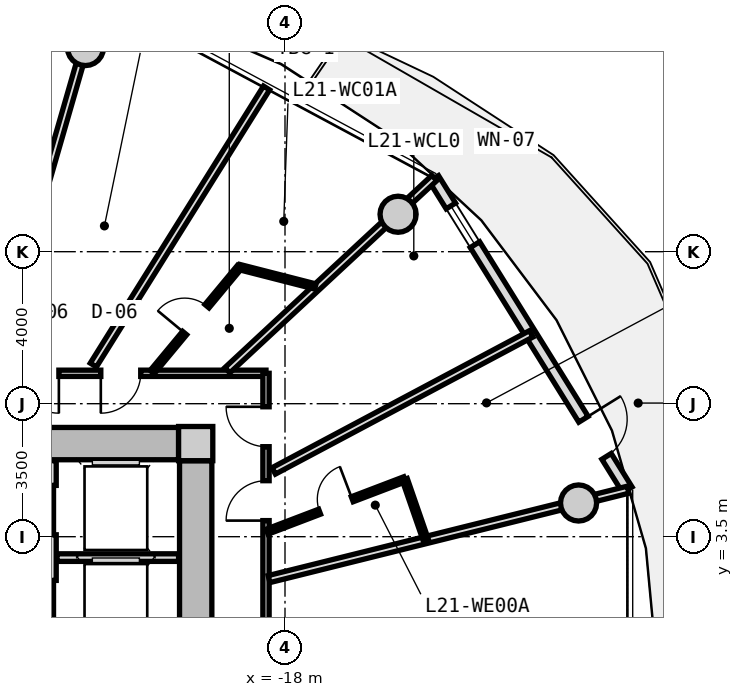
"""IFC4 building model, lengths in metres.
Left out: names, types, materials, properties, quantities, classifications, styles, units other than length and angle.
Written with IfcOpenShell. Run it as: python <this file> out.ifc"""

import sys

from ifc_helpers import new_model, si_unit, direction, frame, frame_2d, origin, origin_2d, place, context, subcontext, project, spatial, rectangle, circle, extrude, source, transform, mapped, element, fill, save


model = new_model("IFC4")
c1 = context("Model", 3, precision=1e-05, world=origin(), true_north=direction((0.0, 1.0)))
c2 = subcontext(c1, "Body", "Model", "MODEL_VIEW")
j1 = project(units=[si_unit("LENGTHUNIT", "METRE"), si_unit("PLANEANGLEUNIT", "RADIAN")], contexts=[c1])
p1 = place(None, origin())
s1 = spatial("IfcSite", under=j1, at=p1, CompositionType="ELEMENT")
p2 = place(p1, origin())
s2 = spatial("IfcBuilding", under=s1, at=p2, CompositionType="ELEMENT")
p3 = place(p2, frame((0.0, 0.0, 70.4)))
s3 = spatial("IfcBuildingStorey", under=s2, at=p3, CompositionType="ELEMENT", Elevation=70.4)
m1 = source(origin(), c2, "Body", "SweptSolid", [
    extrude(rectangle(XDim=0.9, YDim=0.9, at=origin_2d()), origin(), (0.0, 0.0, 1.0), 3.05),
])
p4 = place(p3, frame((-20.35, 5.95, 0.0), z_axis=(0.0, 0.0, 1.0), x_axis=(1.0, 0.0, 0.0)))
e1 = element("IfcColumn", 1, at=p4, inside=s3, PredefinedType="COLUMN", context=c2, shape_type="MappedRepresentation", body=[
    mapped(m1, transform((0.0, 0.0, 0.0), x_axis=(1.0, 0.0, 0.0), y_axis=(0.0, 1.0, 0.0), z_axis=(0.0, 0.0, 1.0), scale=1.0)),
])
m2 = source(origin(), c2, "Body", "SweptSolid", [
    extrude(rectangle(XDim=14.4, YDim=0.85, at=frame_2d((7.2, 0.0))), origin(), (0.0, 0.0, 1.0), 2.73),
])
p5 = place(p3, frame((-35.2, 5.95, 0.0), z_axis=(0.0, 0.0, 1.0), x_axis=(1.0, 0.0, 0.0)))
e2 = element("IfcWall", 2, at=p5, inside=s3, PredefinedType="SHEAR", context=c2, shape_type="MappedRepresentation", body=[
    mapped(m2, transform((0.0, 0.0, 0.0), x_axis=(1.0, 0.0, 0.0), y_axis=(0.0, 1.0, 0.0), z_axis=(0.0, 0.0, 1.0), scale=1.0)),
])
m3 = source(origin(), c2, "Body", "SweptSolid", [
    extrude(rectangle(XDim=11.0, YDim=0.85, at=frame_2d((5.5, 0.0))), origin(), (0.0, 0.0, 1.0), 2.73),
])
p6 = place(p3, frame((-20.35, 5.5, 0.0), z_axis=(0.0, 0.0, 1.0), x_axis=(0.0, -1.0, 0.0)))
e3 = element("IfcWall", 3, at=p6, inside=s3, PredefinedType="SHEAR", context=c2, shape_type="MappedRepresentation", body=[
    mapped(m3, transform((0.0, 0.0, 0.0), x_axis=(1.0, 0.0, 0.0), y_axis=(0.0, 1.0, 0.0), z_axis=(0.0, 0.0, 1.0), scale=1.0)),
])
p7 = place(p6, frame((5.65, 0.0, 0.0)))
e4 = element("IfcOpeningElement", 4, at=p7, cuts=e3, PredefinedType="OPENING", context=c2, shape_type="SweptSolid", body=[
    extrude(rectangle(XDim=1.2, YDim=2.15, at=frame_2d((0.6, 1.075))), frame((0.0, 0.435, 0.0), z_axis=(0.0, -1.0, 0.0), x_axis=(1.0, 0.0, 0.0)), (0.0, 0.0, 1.0), 0.87),
])
m4 = source(origin(), c2, "Body", "SweptSolid", [
    extrude(circle(Radius=0.475, at=origin_2d()), origin(), (0.0, 0.0, 1.0), 3.05),
])
for number, where, z_axis, x_axis in (
    (5, (-10.275, 4.387, 0.0), (0.0, 0.0, 1.0), (1.0, 0.0, 0.0)),
    (6, (-15.025, 11.985, 0.0), (0.0, 0.0, 1.0), (1.0, 0.0, 0.0)),
    (7, (-23.251, 16.373, 0.0), (0.0, 0.0, 1.0), (1.0, 0.0, 0.0)),
):
    element("IfcColumn", number, at=place(p3, frame(where, z_axis=z_axis, x_axis=x_axis)), inside=s3, PredefinedType="COLUMN", context=c2, shape_type="MappedRepresentation", body=[
        mapped(m4, transform((0.0, 0.0, 0.0), x_axis=(1.0, 0.0, 0.0), y_axis=(0.0, 1.0, 0.0), z_axis=(0.0, 0.0, 1.0), scale=1.0)),
    ])
m5 = source(origin(), c2, "Body", "SweptSolid", [
    extrude(rectangle(XDim=9.649, YDim=0.29, at=frame_2d((4.824, 0.0))), origin(), (0.0, 0.0, 1.0), 2.73),
])
p8 = place(p3, frame((-14.084, 12.926, 0.0), z_axis=(0.0, 0.0, 1.0), x_axis=(0.527909458386, -0.849300655684, 0.0)))
e8 = element("IfcWall", 8, at=p8, inside=s3, PredefinedType="SOLIDWALL", context=c2, shape_type="MappedRepresentation", body=[
    mapped(m5, transform((0.0, 0.0, 0.0), x_axis=(1.0, 0.0, 0.0), y_axis=(0.0, 1.0, 0.0), z_axis=(0.0, 0.0, 1.0), scale=1.0)),
])
p9 = place(p8, frame((7.46, 0.0, 0.0)))
e9 = element("IfcOpeningElement", 9, at=p9, cuts=e8, PredefinedType="OPENING", context=c2, shape_type="SweptSolid", body=[
    extrude(rectangle(XDim=1.15, YDim=2.25, at=frame_2d((0.575, 1.125))), frame((0.0, 0.155, 0.0), z_axis=(0.0, -1.0, 0.0), x_axis=(1.0, 0.0, 0.0)), (0.0, 0.0, 1.0), 0.31),
])
p10 = place(p8, frame((0.85, 0.0, 0.85)))
e10 = element("IfcOpeningElement", 10, at=p10, cuts=e8, PredefinedType="OPENING", context=c2, shape_type="SweptSolid", body=[
    extrude(rectangle(XDim=1.2, YDim=1.5, at=frame_2d((0.6, 0.75))), frame((0.0, 0.155, 0.0), z_axis=(0.0, -1.0, 0.0), x_axis=(1.0, 0.0, 0.0)), (0.0, 0.0, 1.0), 0.31),
])
m6 = source(origin(), c2, "Body", "SweptSolid", [
    extrude(rectangle(XDim=5.0, YDim=0.24, at=frame_2d((2.5, 0.0))), origin(), (0.0, 0.0, 1.0), 2.715),
])
p11 = place(p3, frame((-24.14, 0.5, 0.0), z_axis=(0.0, 0.0, 1.0), x_axis=(0.0, 1.0, 0.0)))
e11 = element("IfcWall", 11, at=p11, inside=s3, PredefinedType="PARTITIONING", context=c2, shape_type="MappedRepresentation", body=[
    mapped(m6, transform((0.0, 0.0, 0.0), x_axis=(1.0, 0.0, 0.0), y_axis=(0.0, 1.0, 0.0), z_axis=(0.0, 0.0, 1.0), scale=1.0)),
])
p12 = place(p11, frame((3.05, 0.0, 0.0)))
e12 = element("IfcOpeningElement", 12, at=p12, cuts=e11, PredefinedType="OPENING", context=c2, shape_type="SweptSolid", body=[
    extrude(rectangle(XDim=1.3, YDim=2.2, at=frame_2d((0.65, 1.1))), frame((0.0, 0.13, 0.0), z_axis=(0.0, -1.0, 0.0), x_axis=(1.0, 0.0, 0.0)), (0.0, 0.0, 1.0), 0.26),
])
p13 = place(p11, frame((0.55, 0.0, 0.0)))
e13 = element("IfcOpeningElement", 13, at=p13, cuts=e11, PredefinedType="OPENING", context=c2, shape_type="SweptSolid", body=[
    extrude(rectangle(XDim=1.3, YDim=2.2, at=frame_2d((0.65, 1.1))), frame((0.0, 0.13, 0.0), z_axis=(0.0, -1.0, 0.0), x_axis=(1.0, 0.0, 0.0)), (0.0, 0.0, 1.0), 0.26),
])
m7 = source(origin(), c2, "Body", "SweptSolid", [
    extrude(rectangle(XDim=3.2, YDim=0.2, at=frame_2d((1.6, 0.0))), origin(), (0.0, 0.0, 1.0), 2.715),
])
p14 = place(p3, frame((-24.0, 2.95, 0.0), z_axis=(0.0, 0.0, 1.0), x_axis=(1.0, 0.0, 0.0)))
e14 = element("IfcWall", 14, at=p14, inside=s3, PredefinedType="PARTITIONING", context=c2, shape_type="MappedRepresentation", body=[
    mapped(m7, transform((0.0, 0.0, 0.0), x_axis=(1.0, 0.0, 0.0), y_axis=(0.0, 1.0, 0.0), z_axis=(0.0, 0.0, 1.0), scale=1.0)),
])
m8 = source(origin(), c2, "Body", "SweptSolid", [
    extrude(rectangle(XDim=19.0, YDim=0.165, at=frame_2d((9.5, 0.0))), origin(), (0.0, 0.0, 1.0), 2.715),
])
p15 = place(p3, frame((-37.5, 7.8, 0.0), z_axis=(0.0, 0.0, 1.0), x_axis=(1.0, 0.0, 0.0)))
e15 = element("IfcWall", 15, at=p15, inside=s3, PredefinedType="PARTITIONING", context=c2, shape_type="MappedRepresentation", body=[
    mapped(m8, transform((0.0, 0.0, 0.0), x_axis=(1.0, 0.0, 0.0), y_axis=(0.0, 1.0, 0.0), z_axis=(0.0, 0.0, 1.0), scale=1.0)),
])
p16 = place(p15, frame((14.653, 0.0, 0.0)))
e16 = element("IfcOpeningElement", 16, at=p16, cuts=e15, PredefinedType="OPENING", context=c2, shape_type="SweptSolid", body=[
    extrude(rectangle(XDim=1.05, YDim=2.15, at=frame_2d((0.525, 1.075))), frame((0.0, 0.093, 0.0), z_axis=(0.0, -1.0, 0.0), x_axis=(1.0, 0.0, 0.0)), (0.0, 0.0, 1.0), 0.185),
])
p17 = place(p15, frame((12.5, 0.0, 0.0)))
e17 = element("IfcOpeningElement", 17, at=p17, cuts=e15, PredefinedType="OPENING", context=c2, shape_type="SweptSolid", body=[
    extrude(rectangle(XDim=1.05, YDim=2.15, at=frame_2d((0.525, 1.075))), frame((0.0, 0.093, 0.0), z_axis=(0.0, -1.0, 0.0), x_axis=(1.0, 0.0, 0.0)), (0.0, 0.0, 1.0), 0.185),
])
p18 = place(p15, frame((9.352, 0.0, 0.0)))
e18 = element("IfcOpeningElement", 18, at=p18, cuts=e15, PredefinedType="OPENING", context=c2, shape_type="SweptSolid", body=[
    extrude(rectangle(XDim=1.05, YDim=2.15, at=frame_2d((0.525, 1.075))), frame((0.0, 0.093, 0.0), z_axis=(0.0, -1.0, 0.0), x_axis=(1.0, 0.0, 0.0)), (0.0, 0.0, 1.0), 0.185),
])
p19 = place(p15, frame((7.806, 0.0, 0.0)))
e19 = element("IfcOpeningElement", 19, at=p19, cuts=e15, PredefinedType="OPENING", context=c2, shape_type="SweptSolid", body=[
    extrude(rectangle(XDim=1.05, YDim=2.15, at=frame_2d((0.525, 1.075))), frame((0.0, 0.093, 0.0), z_axis=(0.0, -1.0, 0.0), x_axis=(1.0, 0.0, 0.0)), (0.0, 0.0, 1.0), 0.185),
])
p20 = place(p15, frame((4.773, 0.0, 0.0)))
e20 = element("IfcOpeningElement", 20, at=p20, cuts=e15, PredefinedType="OPENING", context=c2, shape_type="SweptSolid", body=[
    extrude(rectangle(XDim=1.05, YDim=2.15, at=frame_2d((0.525, 1.075))), frame((0.0, 0.093, 0.0), z_axis=(0.0, -1.0, 0.0), x_axis=(1.0, 0.0, 0.0)), (0.0, 0.0, 1.0), 0.185),
])
p21 = place(p15, frame((2.251, 0.0, 0.0)))
e21 = element("IfcOpeningElement", 21, at=p21, cuts=e15, PredefinedType="OPENING", context=c2, shape_type="SweptSolid", body=[
    extrude(rectangle(XDim=1.05, YDim=2.15, at=frame_2d((0.525, 1.075))), frame((0.0, 0.093, 0.0), z_axis=(0.0, -1.0, 0.0), x_axis=(1.0, 0.0, 0.0)), (0.0, 0.0, 1.0), 0.185),
])
m9 = source(origin(), c2, "Body", "SweptSolid", [
    extrude(rectangle(XDim=15.6, YDim=0.165, at=frame_2d((7.8, 0.0))), origin(), (0.0, 0.0, 1.0), 2.715),
])
p22 = place(p3, frame((-18.5, 7.8, 0.0), z_axis=(0.0, 0.0, 1.0), x_axis=(0.0, -1.0, 0.0)))
e22 = element("IfcWall", 22, at=p22, inside=s3, PredefinedType="PARTITIONING", context=c2, shape_type="MappedRepresentation", body=[
    mapped(m9, transform((0.0, 0.0, 0.0), x_axis=(1.0, 0.0, 0.0), y_axis=(0.0, 1.0, 0.0), z_axis=(0.0, 0.0, 1.0), scale=1.0)),
])
p23 = place(p22, frame((12.141, 0.0, 0.0)))
e23 = element("IfcOpeningElement", 23, at=p23, cuts=e22, PredefinedType="OPENING", context=c2, shape_type="SweptSolid", body=[
    extrude(rectangle(XDim=1.25, YDim=2.2, at=frame_2d((0.625, 1.1))), frame((0.0, 0.093, 0.0), z_axis=(0.0, -1.0, 0.0), x_axis=(1.0, 0.0, 0.0)), (0.0, 0.0, 1.0), 0.185),
])
p24 = place(p22, frame((7.175, 0.0, 0.0)))
e24 = element("IfcOpeningElement", 24, at=p24, cuts=e22, PredefinedType="OPENING", context=c2, shape_type="SweptSolid", body=[
    extrude(rectangle(XDim=1.25, YDim=2.2, at=frame_2d((0.625, 1.1))), frame((0.0, 0.093, 0.0), z_axis=(0.0, -1.0, 0.0), x_axis=(1.0, 0.0, 0.0)), (0.0, 0.0, 1.0), 0.185),
])
p25 = place(p22, frame((2.826, 0.0, 0.0)))
e25 = element("IfcOpeningElement", 25, at=p25, cuts=e22, PredefinedType="OPENING", context=c2, shape_type="SweptSolid", body=[
    extrude(rectangle(XDim=1.05, YDim=2.15, at=frame_2d((0.525, 1.075))), frame((0.0, 0.093, 0.0), z_axis=(0.0, -1.0, 0.0), x_axis=(1.0, 0.0, 0.0)), (0.0, 0.0, 1.0), 0.185),
])
p26 = place(p22, frame((0.881, 0.0, 0.0)))
e26 = element("IfcOpeningElement", 26, at=p26, cuts=e22, PredefinedType="OPENING", context=c2, shape_type="SweptSolid", body=[
    extrude(rectangle(XDim=1.05, YDim=2.15, at=frame_2d((0.525, 1.075))), frame((0.0, 0.093, 0.0), z_axis=(0.0, -1.0, 0.0), x_axis=(1.0, 0.0, 0.0)), (0.0, 0.0, 1.0), 0.185),
])
m10 = source(origin(), c2, "Body", "SweptSolid", [
    extrude(rectangle(XDim=9.737, YDim=0.19, at=frame_2d((4.869, 0.0))), origin(), (0.0, 0.0, 1.0), 2.165),
])
p27 = place(p3, frame((-18.42, 2.385, 0.0), z_axis=(0.0, 0.0, 1.0), x_axis=(0.970392716238, 0.241532557375, 0.0)))
e27 = element("IfcWall", 27, at=p27, inside=s3, PredefinedType="PARTITIONING", context=c2, shape_type="MappedRepresentation", body=[
    mapped(m10, transform((0.0, 0.0, 0.0), x_axis=(1.0, 0.0, 0.0), y_axis=(0.0, 1.0, 0.0), z_axis=(0.0, 0.0, 1.0), scale=1.0)),
])
m11 = source(origin(), c2, "Body", "SweptSolid", [
    extrude(rectangle(XDim=7.435, YDim=0.19, at=frame_2d((3.717, 0.0))), origin(), (0.0, 0.0, 1.0), 2.165),
])
p28 = place(p3, frame((-19.517, 7.88, 0.0), z_axis=(0.0, 0.0, 1.0), x_axis=(0.732651956848, 0.680603489652, 0.0)))
e28 = element("IfcWall", 28, at=p28, inside=s3, PredefinedType="PARTITIONING", context=c2, shape_type="MappedRepresentation", body=[
    mapped(m11, transform((0.0, 0.0, 0.0), x_axis=(1.0, 0.0, 0.0), y_axis=(0.0, 1.0, 0.0), z_axis=(0.0, 0.0, 1.0), scale=1.0)),
])
m12 = source(origin(), c2, "Body", "SweptSolid", [
    extrude(rectangle(XDim=7.677, YDim=0.19, at=frame_2d((3.838, 0.0))), origin(), (0.0, 0.0, 1.0), 2.715),
])
p29 = place(p3, frame((-18.297, 5.231, 0.0), z_axis=(0.0, 0.0, 1.0), x_axis=(0.882725057546, 0.469889851753, 0.0)))
e29 = element("IfcWall", 29, at=p29, inside=s3, PredefinedType="PARTITIONING", context=c2, shape_type="MappedRepresentation", body=[
    mapped(m12, transform((0.0, 0.0, 0.0), x_axis=(1.0, 0.0, 0.0), y_axis=(0.0, 1.0, 0.0), z_axis=(0.0, 0.0, 1.0), scale=1.0)),
])
m13 = source(origin(), c2, "Body", "SweptSolid", [
    extrude(rectangle(XDim=3.874, YDim=0.14, at=frame_2d((1.937, 0.0))), origin(), (0.0, 0.0, 1.0), 2.715),
])
p30 = place(p3, frame((-18.47, 3.632, 0.0), z_axis=(0.0, 0.0, 1.0), x_axis=(0.934461775659, 0.35606346321, 0.0)))
e30 = element("IfcWall", 30, at=p30, inside=s3, PredefinedType="PARTITIONING", context=c2, shape_type="MappedRepresentation", body=[
    mapped(m13, transform((0.0, 0.0, 0.0), x_axis=(1.0, 0.0, 0.0), y_axis=(0.0, 1.0, 0.0), z_axis=(0.0, 0.0, 1.0), scale=1.0)),
])
p31 = place(p30, frame((1.477, 0.0, 0.0)))
e31 = element("IfcOpeningElement", 31, at=p31, cuts=e30, PredefinedType="OPENING", context=c2, shape_type="SweptSolid", body=[
    extrude(rectangle(XDim=0.92, YDim=2.1, at=frame_2d((0.46, 1.05))), frame((0.0, 0.08, 0.0), z_axis=(0.0, -1.0, 0.0), x_axis=(1.0, 0.0, 0.0)), (0.0, 0.0, 1.0), 0.16),
])
m14 = source(origin(), c2, "Body", "SweptSolid", [
    extrude(rectangle(XDim=1.676, YDim=0.14, at=frame_2d((0.838, 0.0))), origin(), (0.0, 0.0, 1.0), 2.715),
])
p32 = place(p3, frame((-14.85, 5.011, 0.0), z_axis=(0.0, 0.0, 1.0), x_axis=(0.327785970556, -0.944752008469, 0.0)))
e32 = element("IfcWall", 32, at=p32, inside=s3, PredefinedType="PARTITIONING", context=c2, shape_type="MappedRepresentation", body=[
    mapped(m14, transform((0.0, 0.0, 0.0), x_axis=(1.0, 0.0, 0.0), y_axis=(0.0, 1.0, 0.0), z_axis=(0.0, 0.0, 1.0), scale=1.0)),
])
m15 = source(origin(), c2, "Body", "SweptSolid", [
    extrude(rectangle(XDim=10.196, YDim=0.19, at=frame_2d((5.098, 0.0))), origin(), (0.0, 0.0, 1.0), 2.165),
])
p33 = place(p3, frame((-25.727, 7.88, 0.0), z_axis=(0.0, 0.0, 1.0), x_axis=(0.277136420347, 0.960830580549, 0.0)))
e33 = element("IfcWall", 33, at=p33, inside=s3, PredefinedType="PARTITIONING", context=c2, shape_type="MappedRepresentation", body=[
    mapped(m15, transform((0.0, 0.0, 0.0), x_axis=(1.0, 0.0, 0.0), y_axis=(0.0, 1.0, 0.0), z_axis=(0.0, 0.0, 1.0), scale=1.0)),
])
m16 = source(origin(), c2, "Body", "SweptSolid", [
    extrude(rectangle(XDim=8.598, YDim=0.19, at=frame_2d((4.299, 0.0))), origin(), (0.0, 0.0, 1.0), 2.715),
])
p34 = place(p3, frame((-23.043, 8.017, 0.0), z_axis=(0.0, 0.0, 1.0), x_axis=(0.530039776395, 0.847972779893, 0.0)))
e34 = element("IfcWall", 34, at=p34, inside=s3, PredefinedType="PARTITIONING", context=c2, shape_type="MappedRepresentation", body=[
    mapped(m16, transform((0.0, 0.0, 0.0), x_axis=(1.0, 0.0, 0.0), y_axis=(0.0, 1.0, 0.0), z_axis=(0.0, 0.0, 1.0), scale=1.0)),
])
m17 = source(origin(), c2, "Body", "SweptSolid", [
    extrude(rectangle(XDim=3.594, YDim=0.14, at=frame_2d((1.797, 0.0))), origin(), (0.0, 0.0, 1.0), 2.715),
])
p35 = place(p3, frame((-21.496, 7.83, 0.0), z_axis=(0.0, 0.0, 1.0), x_axis=(0.639001147083, 0.769205781326, 0.0)))
e35 = element("IfcWall", 35, at=p35, inside=s3, PredefinedType="PARTITIONING", context=c2, shape_type="MappedRepresentation", body=[
    mapped(m17, transform((0.0, 0.0, 0.0), x_axis=(1.0, 0.0, 0.0), y_axis=(0.0, 1.0, 0.0), z_axis=(0.0, 0.0, 1.0), scale=1.0)),
])
p36 = place(p35, frame((1.337, 0.0, 0.0)))
e36 = element("IfcOpeningElement", 36, at=p36, cuts=e35, PredefinedType="OPENING", context=c2, shape_type="SweptSolid", body=[
    extrude(rectangle(XDim=0.92, YDim=2.1, at=frame_2d((0.46, 1.05))), frame((0.0, 0.08, 0.0), z_axis=(0.0, -1.0, 0.0), x_axis=(1.0, 0.0, 0.0)), (0.0, 0.0, 1.0), 0.16),
])
m18 = source(origin(), c2, "Body", "SweptSolid", [
    extrude(rectangle(XDim=2.062, YDim=0.14, at=frame_2d((1.031, 0.0))), origin(), (0.0, 0.0, 1.0), 2.355),
])
p37 = place(p3, frame((-19.199, 10.595, 0.0), z_axis=(0.0, 0.0, 1.0), x_axis=(0.968776253543, -0.247936626121, 0.0)))
e37 = element("IfcWall", 37, at=p37, inside=s3, PredefinedType="PARTITIONING", context=c2, shape_type="MappedRepresentation", body=[
    mapped(m18, transform((0.0, 0.0, 0.0), x_axis=(1.0, 0.0, 0.0), y_axis=(0.0, 1.0, 0.0), z_axis=(0.0, 0.0, 1.0), scale=1.0)),
])
m19 = source(origin(), c2, "Body", "SweptSolid", [
    extrude(rectangle(XDim=1.15, YDim=2.25, at=frame_2d((0.575, 1.125))), frame((0.0, 0.025, 0.0), z_axis=(0.0, -1.0, 0.0), x_axis=(1.0, 0.0, 0.0)), (0.0, 0.0, 1.0), 0.05),
])
p38 = place(p9, origin())
e38 = element("IfcDoor", 38, at=p38, inside=s3, OperationType="SINGLE_SWING_LEFT", PredefinedType="DOOR", context=c2, shape_type="MappedRepresentation", body=[
    mapped(m19, transform((0.0, 0.0, 0.0), x_axis=(1.0, 0.0, 0.0), y_axis=(0.0, 1.0, 0.0), z_axis=(0.0, 0.0, 1.0), scale=1.0)),
])
fill(e9, e38)
m20 = source(origin(), c2, "Body", "SweptSolid", [
    extrude(rectangle(XDim=1.2, YDim=1.5, at=frame_2d((0.6, 0.75))), frame((0.0, 0.03, 0.0), z_axis=(0.0, -1.0, 0.0), x_axis=(1.0, 0.0, 0.0)), (0.0, 0.0, 1.0), 0.06),
])
p39 = place(p10, origin())
e39 = element("IfcWindow", 39, at=p39, inside=s3, PartitioningType="SINGLE_PANEL", PredefinedType="WINDOW", context=c2, shape_type="MappedRepresentation", body=[
    mapped(m20, transform((0.0, 0.0, 0.0), x_axis=(1.0, 0.0, 0.0), y_axis=(0.0, 1.0, 0.0), z_axis=(0.0, 0.0, 1.0), scale=1.0)),
])
fill(e10, e39)
m21 = source(origin(), c2, "Body", "SweptSolid", [
    extrude(rectangle(XDim=1.3, YDim=2.2, at=frame_2d((0.65, 1.1))), frame((0.0, 0.025, 0.0), z_axis=(0.0, -1.0, 0.0), x_axis=(1.0, 0.0, 0.0)), (0.0, 0.0, 1.0), 0.05),
])
p40 = place(p12, origin())
e40 = element("IfcDoor", 40, at=p40, inside=s3, OperationType="SLIDING_TO_LEFT", PredefinedType="DOOR", context=c2, shape_type="MappedRepresentation", body=[
    mapped(m21, transform((0.0, 0.0, 0.0), x_axis=(1.0, 0.0, 0.0), y_axis=(0.0, 1.0, 0.0), z_axis=(0.0, 0.0, 1.0), scale=1.0)),
])
fill(e12, e40)
p41 = place(p13, origin())
e41 = element("IfcDoor", 41, at=p41, inside=s3, OperationType="SLIDING_TO_RIGHT", PredefinedType="DOOR", context=c2, shape_type="MappedRepresentation", body=[
    mapped(m21, transform((0.0, 0.0, 0.0), x_axis=(1.0, 0.0, 0.0), y_axis=(0.0, 1.0, 0.0), z_axis=(0.0, 0.0, 1.0), scale=1.0)),
])
fill(e13, e41)
m22 = source(origin(), c2, "Body", "SweptSolid", [
    extrude(rectangle(XDim=1.05, YDim=2.15, at=frame_2d((0.525, 1.075))), frame((0.0, 0.025, 0.0), z_axis=(0.0, -1.0, 0.0), x_axis=(1.0, 0.0, 0.0)), (0.0, 0.0, 1.0), 0.05),
])
p42 = place(p25, frame((1.05, 0.0, 0.0), z_axis=(0.0, 0.0, 1.0), x_axis=(-1.0, 0.0, 0.0)))
e42 = element("IfcDoor", 42, at=p42, inside=s3, OperationType="SINGLE_SWING_LEFT", PredefinedType="DOOR", context=c2, shape_type="MappedRepresentation", body=[
    mapped(m22, transform((0.0, 0.0, 0.0), x_axis=(1.0, 0.0, 0.0), y_axis=(0.0, 1.0, 0.0), z_axis=(0.0, 0.0, 1.0), scale=1.0)),
])
fill(e25, e42)
m23 = source(origin(), c2, "Body", "SweptSolid", [
    extrude(rectangle(XDim=0.92, YDim=2.1, at=frame_2d((0.46, 1.05))), frame((0.0, 0.025, 0.0), z_axis=(0.0, -1.0, 0.0), x_axis=(1.0, 0.0, 0.0)), (0.0, 0.0, 1.0), 0.05),
])
p43 = place(p31, origin())
e43 = element("IfcDoor", 43, at=p43, inside=s3, OperationType="SINGLE_SWING_RIGHT", PredefinedType="DOOR", context=c2, shape_type="MappedRepresentation", body=[
    mapped(m23, transform((0.0, 0.0, 0.0), x_axis=(1.0, 0.0, 0.0), y_axis=(0.0, 1.0, 0.0), z_axis=(0.0, 0.0, 1.0), scale=1.0)),
])
fill(e31, e43)
p44 = place(p26, frame((1.05, 0.0, 0.0), z_axis=(0.0, 0.0, 1.0), x_axis=(-1.0, 0.0, 0.0)))
e44 = element("IfcDoor", 44, at=p44, inside=s3, OperationType="SINGLE_SWING_RIGHT", PredefinedType="DOOR", context=c2, shape_type="MappedRepresentation", body=[
    mapped(m22, transform((0.0, 0.0, 0.0), x_axis=(1.0, 0.0, 0.0), y_axis=(0.0, 1.0, 0.0), z_axis=(0.0, 0.0, 1.0), scale=1.0)),
])
fill(e26, e44)
p45 = place(p16, frame((1.05, 0.0, 0.0), z_axis=(0.0, 0.0, 1.0), x_axis=(-1.0, 0.0, 0.0)))
e45 = element("IfcDoor", 45, at=p45, inside=s3, OperationType="SINGLE_SWING_RIGHT", PredefinedType="DOOR", context=c2, shape_type="MappedRepresentation", body=[
    mapped(m22, transform((0.0, 0.0, 0.0), x_axis=(1.0, 0.0, 0.0), y_axis=(0.0, 1.0, 0.0), z_axis=(0.0, 0.0, 1.0), scale=1.0)),
])
fill(e16, e45)
p46 = place(p36, origin())
e46 = element("IfcDoor", 46, at=p46, inside=s3, OperationType="SINGLE_SWING_LEFT", PredefinedType="DOOR", context=c2, shape_type="MappedRepresentation", body=[
    mapped(m23, transform((0.0, 0.0, 0.0), x_axis=(1.0, 0.0, 0.0), y_axis=(0.0, 1.0, 0.0), z_axis=(0.0, 0.0, 1.0), scale=1.0)),
])
fill(e36, e46)
p47 = place(p17, frame((1.05, 0.0, 0.0), z_axis=(0.0, 0.0, 1.0), x_axis=(-1.0, 0.0, 0.0)))
e47 = element("IfcDoor", 47, at=p47, inside=s3, OperationType="SINGLE_SWING_LEFT", PredefinedType="DOOR", context=c2, shape_type="MappedRepresentation", body=[
    mapped(m22, transform((0.0, 0.0, 0.0), x_axis=(1.0, 0.0, 0.0), y_axis=(0.0, 1.0, 0.0), z_axis=(0.0, 0.0, 1.0), scale=1.0)),
])
fill(e17, e47)
save(model, sys.argv[1])
